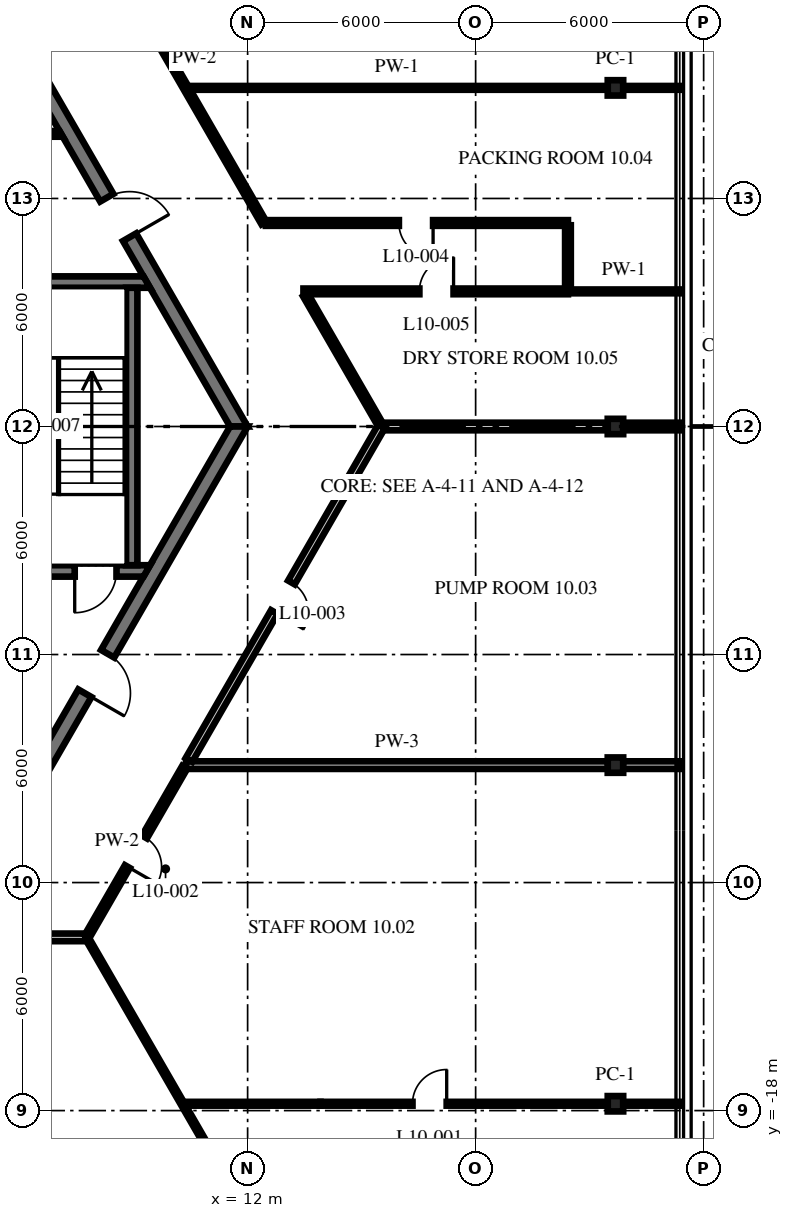
"""IFC4 building model, lengths in metres.
Left out: names, types, materials, properties, quantities, classifications, styles, units other than length and angle.
Written with IfcOpenShell. Run it as: python <this file> out.ifc"""

import sys

from ifc_helpers import new_model, si_unit, direction, frame, frame_2d, origin, origin_2d, place, context, subcontext, project, spatial, polyline, rectangle, i_section, outline, extrude, source, transform, mapped, element, fill, save


model = new_model("IFC4")
c1 = context("Model", 3, precision=1e-05, world=origin(), true_north=direction((0.0, 1.0)))
c2 = subcontext(c1, "Body", "Model", "MODEL_VIEW")
j1 = project(units=[si_unit("LENGTHUNIT", "METRE"), si_unit("PLANEANGLEUNIT", "RADIAN")], contexts=[c1])
p1 = place(None, origin())
s1 = spatial("IfcSite", under=j1, at=p1, CompositionType="ELEMENT")
p2 = place(p1, origin())
s2 = spatial("IfcBuilding", under=s1, at=p2, CompositionType="ELEMENT")
p3 = place(p2, frame((0.0, 0.0, 46.1)))
s3 = spatial("IfcBuildingStorey", under=s2, at=p3, CompositionType="ELEMENT", Elevation=46.1)
m1 = source(origin(), c2, "Body", "SweptSolid", [
    extrude(i_section(OverallWidth=0.404, OverallDepth=0.406, WebThickness=0.027, FlangeThickness=0.044, at=origin_2d()), origin(), (0.0, 0.0, 1.0), 4.3),
])
for number, where, z_axis, x_axis in (
    (1, (21.679, -17.82, 0.0), (0.0, 0.0, 1.0), (0.0, 1.0, 0.0)),
    (2, (21.679, -8.91, 0.0), (0.0, 0.0, 1.0), (0.0, 1.0, 0.0)),
    (3, (21.679, 0.0, 0.0), (0.0, 0.0, 1.0), (0.0, 1.0, 0.0)),
    (4, (21.679, 8.91, 0.0), (0.0, 0.0, 1.0), (0.0, 1.0, 0.0)),
):
    element("IfcColumn", number, at=place(p3, frame(where, z_axis=z_axis, x_axis=x_axis)), inside=s3, PredefinedType="COLUMN", context=c2, shape_type="MappedRepresentation", body=[
        mapped(m1, transform((0.0, 0.0, 0.0), scale=1.0)),
    ])
m2 = source(origin(), c2, "Body", "SweptSolid", [
    extrude(outline(polyline([(-0.115, -0.2), (11.885, -0.2), (11.654, 0.2), (0.115, 0.2), (-0.115, -0.2)])), origin(), (0.0, 0.0, 1.0), 4.1),
])
p4 = place(p3, frame((11.769, 0.0, 0.0), z_axis=(0.0, 0.0, 1.0), x_axis=(-0.499996592174, 0.866027371285, 0.0)))
e5 = element("IfcWall", 5, at=p4, inside=s3, PredefinedType="SHEAR", context=c2, shape_type="MappedRepresentation", body=[
    mapped(m2, transform((0.0, 0.0, 0.0), scale=1.0)),
])
p5 = place(p4, frame((5.75, 0.0, 0.0)))
e6 = element("IfcOpeningElement", 6, at=p5, cuts=e5, PredefinedType="OPENING", context=c2, shape_type="SweptSolid", body=[
    extrude(rectangle(XDim=1.2, YDim=2.1, at=frame_2d((0.6, 1.05))), frame((0.0, 0.21, 0.0), z_axis=(0.0, -1.0, 0.0), x_axis=(1.0, 0.0, 0.0)), (0.0, 0.0, 1.0), 0.42),
])
p6 = place(p3, frame((5.885, -10.192, 0.0), z_axis=(0.0, 0.0, 1.0), x_axis=(0.499996592174, 0.866027371285, 0.0)))
e7 = element("IfcWall", 7, at=p6, inside=s3, PredefinedType="SHEAR", context=c2, shape_type="MappedRepresentation", body=[
    mapped(m2, transform((0.0, 0.0, 0.0), scale=1.0)),
])
p7 = place(p6, frame((3.665, 0.0, 0.0)))
e8 = element("IfcOpeningElement", 8, at=p7, cuts=e7, PredefinedType="OPENING", context=c2, shape_type="SweptSolid", body=[
    extrude(rectangle(XDim=1.2, YDim=2.1, at=frame_2d((0.6, 1.05))), frame((0.0, 0.21, 0.0), z_axis=(0.0, -1.0, 0.0), x_axis=(1.0, 0.0, 0.0)), (0.0, 0.0, 1.0), 0.42),
])
m3 = source(origin(), c2, "Body", "SweptSolid", [
    extrude(outline(polyline([(0.0, -0.15), (0.0, 0.15), (4.26, 0.15), (4.433, -0.15), (0.0, -0.15)])), origin(), (0.0, 0.0, 1.0), 4.1),
])
p8 = place(p3, frame((5.0, 3.8, 0.0), z_axis=(0.0, 0.0, 1.0), x_axis=(1.0, 0.0, 0.0)))
e9 = element("IfcWall", 9, at=p8, inside=s3, PredefinedType="SHEAR", context=c2, shape_type="MappedRepresentation", body=[
    mapped(m3, transform((0.0, 0.0, 0.0), scale=1.0)),
])
m4 = source(origin(), c2, "Body", "SweptSolid", [
    extrude(outline(polyline([(0.0, -0.15), (0.0, 0.15), (4.433, 0.15), (4.26, -0.15), (0.0, -0.15)])), origin(), (0.0, 0.0, 1.0), 4.1),
])
p9 = place(p3, frame((5.0, -3.8, 0.0), z_axis=(0.0, 0.0, 1.0), x_axis=(1.0, 0.0, 0.0)))
e10 = element("IfcWall", 10, at=p9, inside=s3, PredefinedType="SHEAR", context=c2, shape_type="MappedRepresentation", body=[
    mapped(m4, transform((0.0, 0.0, 0.0), scale=1.0)),
])
p10 = place(p9, frame((2.45, 0.0, 0.0)))
e11 = element("IfcOpeningElement", 11, at=p10, cuts=e10, PredefinedType="OPENING", context=c2, shape_type="SweptSolid", body=[
    extrude(rectangle(XDim=1.1, YDim=2.1, at=frame_2d((0.55, 1.05))), frame((0.0, 0.16, 0.0), z_axis=(0.0, -1.0, 0.0), x_axis=(1.0, 0.0, 0.0)), (0.0, 0.0, 1.0), 0.32),
])
m5 = source(origin(), c2, "Body", "SweptSolid", [
    extrude(rectangle(XDim=7.3, YDim=0.3, at=frame_2d((3.65, 0.0))), origin(), (0.0, 0.0, 1.0), 4.1),
])
p11 = place(p3, frame((8.95, -3.65, 0.0), z_axis=(0.0, 0.0, 1.0), x_axis=(0.0, 1.0, 0.0)))
e12 = element("IfcWall", 12, at=p11, inside=s3, PredefinedType="SHEAR", context=c2, shape_type="MappedRepresentation", body=[
    mapped(m5, transform((0.0, 0.0, 0.0), scale=1.0)),
])
m6 = source(origin(), c2, "Body", "SweptSolid", [
    extrude(outline(polyline([(0.0, -0.075), (0.0, 0.075), (3.102, 0.075), (3.188, -0.075), (0.0, -0.075)])), origin(), (0.0, 0.0, 1.0), 4.1),
])
p12 = place(p3, frame((3.95, 7.7, 0.0), z_axis=(0.0, 0.0, 1.0), x_axis=(1.0, 0.0, 0.0)))
e13 = element("IfcWall", 13, at=p12, inside=s3, PredefinedType="PARTITIONING", context=c2, shape_type="MappedRepresentation", body=[
    mapped(m6, transform((0.0, 0.0, 0.0), scale=1.0)),
])
p13 = place(p12, frame((1.6, 0.0, 0.0)))
e14 = element("IfcOpeningElement", 14, at=p13, cuts=e13, PredefinedType="OPENING", context=c2, shape_type="SweptSolid", body=[
    extrude(rectangle(XDim=0.9, YDim=2.1, at=frame_2d((0.45, 1.05))), frame((0.0, 0.085, 0.0), z_axis=(0.0, -1.0, 0.0), x_axis=(1.0, 0.0, 0.0)), (0.0, 0.0, 1.0), 0.17),
])
p14 = place(p3, frame((7.761, -13.442, 0.0), z_axis=(0.0, 0.0, 1.0), x_axis=(0.499995773473, -0.866027843957, 0.0)))
e15 = element("IfcWall", 15, at=p14, inside=s3, PredefinedType="PARTITIONING", context=c2, shape_type="SweptSolid", body=[
    extrude(rectangle(XDim=18.274, YDim=0.1, at=frame_2d((9.137, 0.0))), origin(), (0.0, 0.0, 1.0), 4.1),
])
p15 = place(p3, frame((7.761, 13.442, 0.0), z_axis=(0.0, 0.0, 1.0), x_axis=(0.500005339912, -0.866022320763, 0.0)))
e16 = element("IfcWall", 16, at=p15, inside=s3, PredefinedType="PARTITIONING", context=c2, shape_type="SweptSolid", body=[
    extrude(rectangle(XDim=9.338, YDim=0.15, at=frame_2d((4.669, 0.0))), origin(), (0.0, 0.0, 1.0), 4.1),
])
p16 = place(p15, frame((2.183, 0.0, 0.0)))
e17 = element("IfcOpeningElement", 17, at=p16, cuts=e16, PredefinedType="OPENING", context=c2, shape_type="SweptSolid", body=[
    extrude(rectangle(XDim=0.9, YDim=2.1, at=frame_2d((0.45, 1.05))), frame((0.0, 0.085, 0.0), z_axis=(0.0, -1.0, 0.0), x_axis=(1.0, 0.0, 0.0)), (0.0, 0.0, 1.0), 0.17),
])
p17 = place(p3, frame((13.524, 3.46, 0.0), z_axis=(0.0, 0.0, 1.0), x_axis=(0.500006044118, -0.866021914183, 0.0)))
e18 = element("IfcWall", 18, at=p17, inside=s3, PredefinedType="PARTITIONING", context=c2, shape_type="SweptSolid", body=[
    extrude(rectangle(XDim=3.925, YDim=0.15, at=frame_2d((1.962, 0.0))), origin(), (0.0, 0.0, 1.0), 4.1),
])
p18 = place(p3, frame((10.348, -17.82, 0.0), z_axis=(0.0, 0.0, 1.0), x_axis=(1.0, 0.0, 0.0)))
e19 = element("IfcWall", 19, at=p18, inside=s3, PredefinedType="PARTITIONING", context=c2, shape_type="SweptSolid", body=[
    extrude(rectangle(XDim=3.57, YDim=0.1, at=frame_2d((1.785, 0.0))), origin(), (0.0, 0.0, 1.0), 4.1),
])
m7 = source(origin(), c2, "Body", "SweptSolid", [
    extrude(rectangle(XDim=7.568, YDim=0.1, at=frame_2d((3.784, 0.0))), origin(), (0.0, 0.0, 1.0), 3.488),
])
p19 = place(p3, frame((13.918, -17.82, 0.0), z_axis=(0.0, 0.0, 1.0), x_axis=(1.0, 0.0, 0.0)))
e20 = element("IfcWall", 20, at=p19, inside=s3, PredefinedType="PARTITIONING", context=c2, shape_type="MappedRepresentation", body=[
    mapped(m7, transform((0.0, 0.0, 0.0), scale=1.0)),
])
p20 = place(p19, frame((2.42, 0.0, 0.0)))
e21 = element("IfcOpeningElement", 21, at=p20, cuts=e20, PredefinedType="OPENING", context=c2, shape_type="SweptSolid", body=[
    extrude(rectangle(XDim=0.9, YDim=2.1, at=frame_2d((0.45, 1.05))), frame((0.0, 0.06, 0.0), z_axis=(0.0, -1.0, 0.0), x_axis=(1.0, 0.0, 0.0)), (0.0, 0.0, 1.0), 0.12),
])
m8 = source(origin(), c2, "Body", "SweptSolid", [
    extrude(rectangle(XDim=1.499, YDim=0.1, at=frame_2d((0.749, 0.0))), origin(), (0.0, 0.0, 1.0), 4.1),
])
p21 = place(p3, frame((21.873, -17.82, 0.0), z_axis=(0.0, 0.0, 1.0), x_axis=(1.0, 0.0, 0.0)))
e22 = element("IfcWall", 22, at=p21, inside=s3, PredefinedType="PARTITIONING", context=c2, shape_type="MappedRepresentation", body=[
    mapped(m8, transform((0.0, 0.0, 0.0), scale=1.0)),
])
p22 = place(p3, frame((-7.761, -13.442, 0.0), z_axis=(0.0, 0.0, 1.0), x_axis=(1.0, 0.0, 0.0)))
e23 = element("IfcWall", 23, at=p22, inside=s3, PredefinedType="PARTITIONING", context=c2, shape_type="SweptSolid", body=[
    extrude(rectangle(XDim=15.492, YDim=0.2, at=frame_2d((7.746, 0.0))), origin(), (0.0, 0.0, 1.0), 4.1),
])
p23 = place(p22, frame((4.65, 0.0, 0.0)))
e24 = element("IfcOpeningElement", 24, at=p23, cuts=e23, PredefinedType="OPENING", context=c2, shape_type="SweptSolid", body=[
    extrude(rectangle(XDim=1.0, YDim=2.1, at=frame_2d((0.5, 1.05))), frame((0.0, 0.11, 0.0), z_axis=(0.0, -1.0, 0.0), x_axis=(1.0, 0.0, 0.0)), (0.0, 0.0, 1.0), 0.22),
])
m9 = source(origin(), c2, "Body", "SweptSolid", [
    extrude(rectangle(XDim=11.109, YDim=0.2, at=frame_2d((5.554, 0.0))), origin(), (0.0, 0.0, 1.0), 3.343),
])
p24 = place(p3, frame((10.378, -8.91, 0.0), z_axis=(0.0, 0.0, 1.0), x_axis=(1.0, 0.0, 0.0)))
e25 = element("IfcWall", 25, at=p24, inside=s3, PredefinedType="PARTITIONING", context=c2, shape_type="MappedRepresentation", body=[
    mapped(m9, transform((0.0, 0.0, 0.0), scale=1.0)),
])
m10 = source(origin(), c2, "Body", "SweptSolid", [
    extrude(rectangle(XDim=1.499, YDim=0.2, at=frame_2d((0.749, 0.0))), origin(), (0.0, 0.0, 1.0), 4.1),
])
p25 = place(p3, frame((21.873, -8.91, 0.0), z_axis=(0.0, 0.0, 1.0), x_axis=(1.0, 0.0, 0.0)))
e26 = element("IfcWall", 26, at=p25, inside=s3, PredefinedType="PARTITIONING", context=c2, shape_type="MappedRepresentation", body=[
    mapped(m10, transform((0.0, 0.0, 0.0), scale=1.0)),
])
p26 = place(p3, frame((15.592, 0.0, 0.0), z_axis=(0.0, 0.0, 1.0), x_axis=(1.0, 0.0, 0.0)))
e27 = element("IfcWall", 27, at=p26, inside=s3, PredefinedType="PARTITIONING", context=c2, shape_type="SweptSolid", body=[
    extrude(rectangle(XDim=5.895, YDim=0.2, at=frame_2d((2.947, 0.0))), origin(), (0.0, 0.0, 1.0), 3.488),
])
p27 = place(p3, frame((21.873, 0.0, 0.0), z_axis=(0.0, 0.0, 1.0), x_axis=(1.0, 0.0, 0.0)))
e28 = element("IfcWall", 28, at=p27, inside=s3, PredefinedType="PARTITIONING", context=c2, shape_type="MappedRepresentation", body=[
    mapped(m10, transform((0.0, 0.0, 0.0), scale=1.0)),
])
p28 = place(p3, frame((13.469, 3.555, 0.0), z_axis=(0.0, 0.0, 1.0), x_axis=(1.0, 0.0, 0.0)))
e29 = element("IfcWall", 29, at=p28, inside=s3, PredefinedType="PARTITIONING", context=c2, shape_type="SweptSolid", body=[
    extrude(rectangle(XDim=6.96, YDim=0.15, at=frame_2d((3.48, 0.0))), origin(), (0.0, 0.0, 1.0), 4.1),
])
p29 = place(p28, frame((3.05, 0.0, 0.0)))
e30 = element("IfcOpeningElement", 30, at=p29, cuts=e29, PredefinedType="OPENING", context=c2, shape_type="SweptSolid", body=[
    extrude(rectangle(XDim=0.9, YDim=2.1, at=frame_2d((0.45, 1.05))), frame((0.0, 0.085, 0.0), z_axis=(0.0, -1.0, 0.0), x_axis=(1.0, 0.0, 0.0)), (0.0, 0.0, 1.0), 0.17),
])
m11 = source(origin(), c2, "Body", "SweptSolid", [
    extrude(rectangle(XDim=2.942, YDim=0.1, at=frame_2d((1.471, 0.0))), origin(), (0.0, 0.0, 1.0), 4.1),
])
p30 = place(p3, frame((20.429, 3.555, 0.0), z_axis=(0.0, 0.0, 1.0), x_axis=(1.0, 0.0, 0.0)))
e31 = element("IfcWall", 31, at=p30, inside=s3, PredefinedType="PARTITIONING", context=c2, shape_type="MappedRepresentation", body=[
    mapped(m11, transform((0.0, 0.0, 0.0), scale=1.0)),
])
p31 = place(p3, frame((12.48, 5.355, 0.0), z_axis=(0.0, 0.0, 1.0), x_axis=(1.0, 0.0, 0.0)))
e32 = element("IfcWall", 32, at=p31, inside=s3, PredefinedType="PARTITIONING", context=c2, shape_type="SweptSolid", body=[
    extrude(rectangle(XDim=7.949, YDim=0.15, at=frame_2d((3.975, 0.0))), origin(), (0.0, 0.0, 1.0), 4.1),
])
p32 = place(p31, frame((3.5, 0.0, 0.0)))
e33 = element("IfcOpeningElement", 33, at=p32, cuts=e32, PredefinedType="OPENING", context=c2, shape_type="SweptSolid", body=[
    extrude(rectangle(XDim=0.9, YDim=2.1, at=frame_2d((0.45, 1.05))), frame((0.0, 0.085, 0.0), z_axis=(0.0, -1.0, 0.0), x_axis=(1.0, 0.0, 0.0)), (0.0, 0.0, 1.0), 0.17),
])
p33 = place(p3, frame((10.378, 8.91, 0.0), z_axis=(0.0, 0.0, 1.0), x_axis=(1.0, 0.0, 0.0)))
e34 = element("IfcWall", 34, at=p33, inside=s3, PredefinedType="PARTITIONING", context=c2, shape_type="SweptSolid", body=[
    extrude(rectangle(XDim=11.109, YDim=0.1, at=frame_2d((5.554, 0.0))), origin(), (0.0, 0.0, 1.0), 3.343),
])
p34 = place(p3, frame((21.873, 8.91, 0.0), z_axis=(0.0, 0.0, 1.0), x_axis=(1.0, 0.0, 0.0)))
e35 = element("IfcWall", 35, at=p34, inside=s3, PredefinedType="PARTITIONING", context=c2, shape_type="MappedRepresentation", body=[
    mapped(m8, transform((0.0, 0.0, 0.0), scale=1.0)),
])
p35 = place(p3, frame((7.776, -13.416, 0.0), z_axis=(0.0, 0.0, 1.0), x_axis=(0.50002671436, 0.866009979692, 0.0)))
e36 = element("IfcWall", 36, at=p35, inside=s3, PredefinedType="PARTITIONING", context=c2, shape_type="SweptSolid", body=[
    extrude(rectangle(XDim=5.14, YDim=0.15, at=frame_2d((2.57, 0.0))), origin(), (0.0, 0.0, 1.0), 4.1),
])
p36 = place(p35, frame((2.12, 0.0, 0.0)))
e37 = element("IfcOpeningElement", 37, at=p36, cuts=e36, PredefinedType="OPENING", context=c2, shape_type="SweptSolid", body=[
    extrude(rectangle(XDim=0.9, YDim=2.1, at=frame_2d((0.45, 1.05))), frame((0.0, 0.085, 0.0), z_axis=(0.0, -1.0, 0.0), x_axis=(1.0, 0.0, 0.0)), (0.0, 0.0, 1.0), 0.17),
])
p37 = place(p3, frame((10.456, -8.774, 0.0), z_axis=(0.0, 0.0, 1.0), x_axis=(0.500000566121, 0.866025076934, 0.0)))
e38 = element("IfcWall", 38, at=p37, inside=s3, PredefinedType="PARTITIONING", context=c2, shape_type="SweptSolid", body=[
    extrude(rectangle(XDim=10.132, YDim=0.2, at=frame_2d((5.066, 0.0))), origin(), (0.0, 0.0, 1.0), 4.1),
])
p38 = place(p37, frame((4.493, 0.0, 0.0)))
e39 = element("IfcOpeningElement", 39, at=p38, cuts=e38, PredefinedType="OPENING", context=c2, shape_type="SweptSolid", body=[
    extrude(rectangle(XDim=0.9, YDim=2.1, at=frame_2d((0.45, 1.05))), frame((0.0, 0.11, 0.0), z_axis=(0.0, -1.0, 0.0), x_axis=(1.0, 0.0, 0.0)), (0.0, 0.0, 1.0), 0.22),
])
m12 = source(origin(), c2, "Body", "SweptSolid", [
    extrude(rectangle(XDim=1.68, YDim=0.15, at=frame_2d((0.84, 0.0))), origin(), (0.0, 0.0, 1.0), 4.1),
])
p39 = place(p3, frame((20.429, 3.615, 0.0), z_axis=(0.0, 0.0, 1.0), x_axis=(0.0, 1.0, 0.0)))
e40 = element("IfcWall", 40, at=p39, inside=s3, PredefinedType="PARTITIONING", context=c2, shape_type="MappedRepresentation", body=[
    mapped(m12, transform((0.0, 0.0, 0.0), scale=1.0)),
])
p40 = place(p5, frame((1.2, 0.0, 0.0), z_axis=(0.0, 0.0, 1.0), x_axis=(-1.0, 0.0, 0.0)))
e41 = element("IfcDoor", 41, at=p40, inside=s3, OperationType="SINGLE_SWING_RIGHT", PredefinedType="DOOR", context=c2, shape_type="SweptSolid", body=[
    extrude(rectangle(XDim=1.2, YDim=2.1, at=frame_2d((0.6, 1.05))), frame((0.0, 0.025, 0.0), z_axis=(0.0, -1.0, 0.0), x_axis=(1.0, 0.0, 0.0)), (0.0, 0.0, 1.0), 0.05),
])
fill(e6, e41)
p41 = place(p7, frame((1.2, 0.0, 0.0), z_axis=(0.0, 0.0, 1.0), x_axis=(-1.0, 0.0, 0.0)))
e42 = element("IfcDoor", 42, at=p41, inside=s3, OperationType="SINGLE_SWING_RIGHT", PredefinedType="DOOR", context=c2, shape_type="SweptSolid", body=[
    extrude(rectangle(XDim=1.2, YDim=2.1, at=frame_2d((0.6, 1.05))), frame((0.0, 0.025, 0.0), z_axis=(0.0, -1.0, 0.0), x_axis=(1.0, 0.0, 0.0)), (0.0, 0.0, 1.0), 0.05),
])
fill(e8, e42)
p42 = place(p10, frame((1.1, 0.0, 0.0), z_axis=(0.0, 0.0, 1.0), x_axis=(-1.0, 0.0, 0.0)))
e43 = element("IfcDoor", 43, at=p42, inside=s3, OperationType="SINGLE_SWING_RIGHT", PredefinedType="DOOR", context=c2, shape_type="SweptSolid", body=[
    extrude(rectangle(XDim=1.1, YDim=2.1, at=frame_2d((0.55, 1.05))), frame((0.0, 0.025, 0.0), z_axis=(0.0, -1.0, 0.0), x_axis=(1.0, 0.0, 0.0)), (0.0, 0.0, 1.0), 0.05),
])
fill(e11, e43)
p43 = place(p20, origin())
e44 = element("IfcDoor", 44, at=p43, inside=s3, OperationType="SINGLE_SWING_LEFT", PredefinedType="DOOR", context=c2, shape_type="SweptSolid", body=[
    extrude(rectangle(XDim=0.9, YDim=2.1, at=frame_2d((0.45, 1.05))), frame((0.0, 0.025, 0.0), z_axis=(0.0, -1.0, 0.0), x_axis=(1.0, 0.0, 0.0)), (0.0, 0.0, 1.0), 0.05),
])
fill(e21, e44)
p44 = place(p36, origin())
e45 = element("IfcDoor", 45, at=p44, inside=s3, OperationType="SINGLE_SWING_RIGHT", PredefinedType="DOOR", context=c2, shape_type="SweptSolid", body=[
    extrude(rectangle(XDim=0.9, YDim=2.1, at=frame_2d((0.45, 1.05))), frame((0.0, 0.025, 0.0), z_axis=(0.0, -1.0, 0.0), x_axis=(1.0, 0.0, 0.0)), (0.0, 0.0, 1.0), 0.05),
])
fill(e37, e45)
p45 = place(p38, origin())
e46 = element("IfcDoor", 46, at=p45, inside=s3, OperationType="SINGLE_SWING_RIGHT", PredefinedType="DOOR", context=c2, shape_type="SweptSolid", body=[
    extrude(rectangle(XDim=0.9, YDim=2.1, at=frame_2d((0.45, 1.05))), frame((0.0, 0.025, 0.0), z_axis=(0.0, -1.0, 0.0), x_axis=(1.0, 0.0, 0.0)), (0.0, 0.0, 1.0), 0.05),
])
fill(e39, e46)
p46 = place(p32, origin())
e47 = element("IfcDoor", 47, at=p46, inside=s3, OperationType="SINGLE_SWING_RIGHT", PredefinedType="DOOR", context=c2, shape_type="SweptSolid", body=[
    extrude(rectangle(XDim=0.9, YDim=2.1, at=frame_2d((0.45, 1.05))), frame((0.0, 0.025, 0.0), z_axis=(0.0, -1.0, 0.0), x_axis=(1.0, 0.0, 0.0)), (0.0, 0.0, 1.0), 0.05),
])
fill(e33, e47)
p47 = place(p29, origin())
e48 = element("IfcDoor", 48, at=p47, inside=s3, OperationType="SINGLE_SWING_LEFT", PredefinedType="DOOR", context=c2, shape_type="SweptSolid", body=[
    extrude(rectangle(XDim=0.9, YDim=2.1, at=frame_2d((0.45, 1.05))), frame((0.0, 0.025, 0.0), z_axis=(0.0, -1.0, 0.0), x_axis=(1.0, 0.0, 0.0)), (0.0, 0.0, 1.0), 0.05),
])
fill(e30, e48)
save(model, sys.argv[1])
